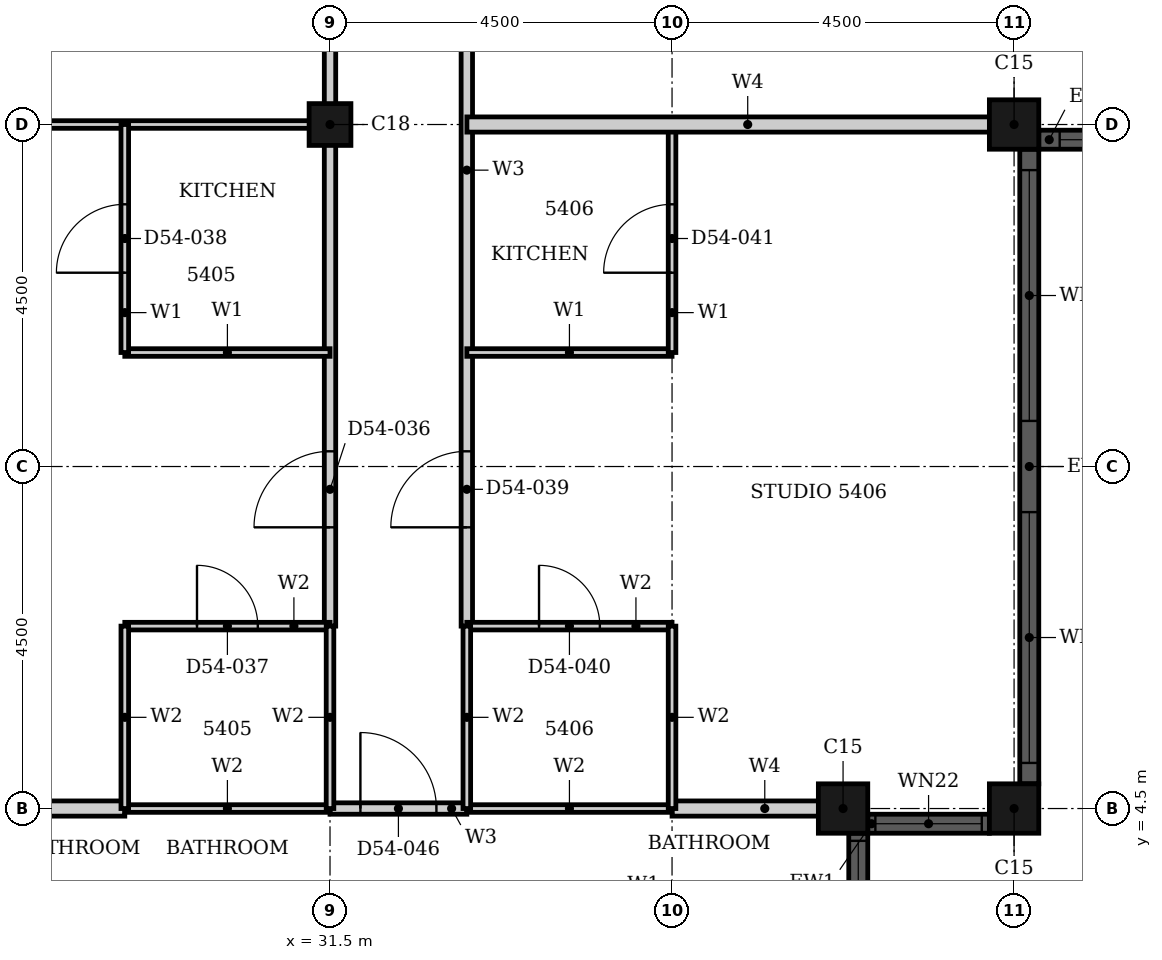
"""IFC4 building model, lengths in metres.
Left out: names, types, materials, properties, quantities, classifications, styles, units other than length and angle.
Written with IfcOpenShell. Run it as: python <this file> out.ifc"""

import sys

from ifc_helpers import new_model, si_unit, direction, frame, frame_2d, origin, origin_2d, place, context, subcontext, project, spatial, rectangle, hollow_rectangle, extrude, element, fill, save


model = new_model("IFC4")
c1 = context("Model", 3, precision=1e-05, world=origin(), true_north=direction((0.0, 1.0)))
c2 = subcontext(c1, "Body", "Model", "MODEL_VIEW")
j1 = project(units=[si_unit("LENGTHUNIT", "METRE"), si_unit("PLANEANGLEUNIT", "RADIAN")], contexts=[c1])
p1 = place(None, origin())
s1 = spatial("IfcSite", under=j1, at=p1, CompositionType="ELEMENT")
p2 = place(p1, origin())
s2 = spatial("IfcBuilding", under=s1, at=p2, CompositionType="ELEMENT")
p3 = place(p2, frame((0.0, 0.0, 214.6)))
s3 = spatial("IfcBuildingStorey", under=s2, at=p3, CompositionType="ELEMENT", Elevation=214.6)
for number, where, z_axis, x_axis in (
    (1, (40.5, 13.5, 0.0), (0.0, 0.0, 1.0), (1.0, 0.0, 0.0)),
    (2, (38.25, 4.5, 0.0), (0.0, 0.0, 1.0), (1.0, 0.0, 0.0)),
    (3, (40.5, 4.5, 0.0), (0.0, 0.0, 1.0), (1.0, 0.0, 0.0)),
):
    element("IfcColumn", number, at=place(p3, frame(where, z_axis=z_axis, x_axis=x_axis)), inside=s3, PredefinedType="COLUMN", context=c2, shape_type="SweptSolid", body=[
        extrude(hollow_rectangle(XDim=0.65, YDim=0.65, WallThickness=0.021, at=origin_2d()), origin(), (0.0, 0.0, 1.0), 3.7),
    ])
p4 = place(p3, frame((31.5, 13.5, 0.0), z_axis=(0.0, 0.0, 1.0), x_axis=(1.0, 0.0, 0.0)))
e4 = element("IfcColumn", 4, at=p4, inside=s3, PredefinedType="COLUMN", context=c2, shape_type="SweptSolid", body=[
    extrude(hollow_rectangle(XDim=0.55, YDim=0.55, WallThickness=0.018, at=origin_2d()), origin(), (0.0, 0.0, 1.0), 3.7),
])
p5 = place(p3, frame((40.825, 13.3, 0.0), z_axis=(0.0, 0.0, 1.0), x_axis=(1.0, 0.0, 0.0)))
e5 = element("IfcWall", 5, at=p5, inside=s3, PredefinedType="SOLIDWALL", context=c2, shape_type="SweptSolid", body=[
    extrude(rectangle(XDim=3.85, YDim=0.25, at=frame_2d((1.925, 0.0))), origin(), (0.0, 0.0, 1.0), 3.7),
])
p6 = place(p5, frame((0.275, 0.0, 0.45)))
e6 = element("IfcOpeningElement", 6, at=p6, cuts=e5, PredefinedType="OPENING", context=c2, shape_type="SweptSolid", body=[
    extrude(rectangle(XDim=3.3, YDim=2.3, at=frame_2d((1.65, 1.15))), frame((0.0, 0.135, 0.0), z_axis=(0.0, -1.0, 0.0), x_axis=(1.0, 0.0, 0.0)), (0.0, 0.0, 1.0), 0.27),
])
p7 = place(p3, frame((38.45, 2.575, 0.0), z_axis=(0.0, 0.0, 1.0), x_axis=(0.0, 1.0, 0.0)))
e7 = element("IfcWall", 7, at=p7, inside=s3, PredefinedType="SOLIDWALL", context=c2, shape_type="SweptSolid", body=[
    extrude(rectangle(XDim=1.6, YDim=0.25, at=frame_2d((0.8, 0.0))), origin(), (0.0, 0.0, 1.0), 3.7),
])
p8 = place(p7, frame((0.1, 0.0, 0.9)))
e8 = element("IfcOpeningElement", 8, at=p8, cuts=e7, PredefinedType="OPENING", context=c2, shape_type="SweptSolid", body=[
    extrude(rectangle(XDim=1.4, YDim=1.85, at=frame_2d((0.7, 0.925))), frame((0.0, 0.135, 0.0), z_axis=(0.0, -1.0, 0.0), x_axis=(1.0, 0.0, 0.0)), (0.0, 0.0, 1.0), 0.27),
])
p9 = place(p3, frame((38.575, 4.3, 0.0), z_axis=(0.0, 0.0, 1.0), x_axis=(1.0, 0.0, 0.0)))
e9 = element("IfcWall", 9, at=p9, inside=s3, PredefinedType="SOLIDWALL", context=c2, shape_type="SweptSolid", body=[
    extrude(rectangle(XDim=1.6, YDim=0.25, at=frame_2d((0.8, 0.0))), origin(), (0.0, 0.0, 1.0), 3.7),
])
p10 = place(p9, frame((0.1, 0.0, 0.9)))
e10 = element("IfcOpeningElement", 10, at=p10, cuts=e9, PredefinedType="OPENING", context=c2, shape_type="SweptSolid", body=[
    extrude(rectangle(XDim=1.4, YDim=1.85, at=frame_2d((0.7, 0.925))), frame((0.0, 0.135, 0.0), z_axis=(0.0, -1.0, 0.0), x_axis=(1.0, 0.0, 0.0)), (0.0, 0.0, 1.0), 0.27),
])
p11 = place(p3, frame((40.7, 4.825, 0.0), z_axis=(0.0, 0.0, 1.0), x_axis=(0.0, 1.0, 0.0)))
e11 = element("IfcWall", 11, at=p11, inside=s3, PredefinedType="SOLIDWALL", context=c2, shape_type="SweptSolid", body=[
    extrude(rectangle(XDim=8.35, YDim=0.25, at=frame_2d((4.175, 0.0))), origin(), (0.0, 0.0, 1.0), 3.7),
])
p12 = place(p11, frame((0.275, 0.0, 0.45)))
e12 = element("IfcOpeningElement", 12, at=p12, cuts=e11, PredefinedType="OPENING", context=c2, shape_type="SweptSolid", body=[
    extrude(rectangle(XDim=3.3, YDim=2.3, at=frame_2d((1.65, 1.15))), frame((0.0, 0.135, 0.0), z_axis=(0.0, -1.0, 0.0), x_axis=(1.0, 0.0, 0.0)), (0.0, 0.0, 1.0), 0.27),
])
p13 = place(p11, frame((4.775, 0.0, 0.45)))
e13 = element("IfcOpeningElement", 13, at=p13, cuts=e11, PredefinedType="OPENING", context=c2, shape_type="SweptSolid", body=[
    extrude(rectangle(XDim=3.3, YDim=2.3, at=frame_2d((1.65, 1.15))), frame((0.0, 0.135, 0.0), z_axis=(0.0, -1.0, 0.0), x_axis=(1.0, 0.0, 0.0)), (0.0, 0.0, 1.0), 0.27),
])
p14 = place(p3, frame((31.5, 4.5, 0.0), z_axis=(0.0, 0.0, 1.0), x_axis=(1.0, 0.0, 0.0)))
e14 = element("IfcWall", 14, at=p14, inside=s3, PredefinedType="PARTITIONING", context=c2, shape_type="SweptSolid", body=[
    extrude(rectangle(XDim=1.8, YDim=0.15, at=frame_2d((0.9, 0.0))), origin(), (0.0, 0.0, 1.0), 3.4),
])
p15 = place(p14, frame((0.4, 0.0, 0.0)))
e15 = element("IfcOpeningElement", 15, at=p15, cuts=e14, PredefinedType="OPENING", context=c2, shape_type="SweptSolid", body=[
    extrude(rectangle(XDim=1.0, YDim=2.2, at=frame_2d((0.5, 1.1))), frame((0.0, 0.085, 0.0), z_axis=(0.0, -1.0, 0.0), x_axis=(1.0, 0.0, 0.0)), (0.0, 0.0, 1.0), 0.17),
])
p16 = place(p3, frame((31.5, 6.9, 0.0), z_axis=(0.0, 0.0, 1.0), x_axis=(0.0, 1.0, 0.0)))
e16 = element("IfcWall", 16, at=p16, inside=s3, PredefinedType="PARTITIONING", context=c2, shape_type="SweptSolid", body=[
    extrude(rectangle(XDim=13.8, YDim=0.15, at=frame_2d((6.9, 0.0))), origin(), (0.0, 0.0, 1.0), 2.68),
])
p17 = place(p16, frame((1.3, 0.0, 0.0)))
e17 = element("IfcOpeningElement", 17, at=p17, cuts=e16, PredefinedType="OPENING", context=c2, shape_type="SweptSolid", body=[
    extrude(rectangle(XDim=1.0, YDim=2.2, at=frame_2d((0.5, 1.1))), frame((0.0, 0.085, 0.0), z_axis=(0.0, -1.0, 0.0), x_axis=(1.0, 0.0, 0.0)), (0.0, 0.0, 1.0), 0.17),
])
p18 = place(p3, frame((33.3, 6.9, 0.0), z_axis=(0.0, 0.0, 1.0), x_axis=(0.0, 1.0, 0.0)))
e18 = element("IfcWall", 18, at=p18, inside=s3, PredefinedType="PARTITIONING", context=c2, shape_type="SweptSolid", body=[
    extrude(rectangle(XDim=13.799, YDim=0.15, at=frame_2d((6.899, 0.0))), origin(), (0.0, 0.0, 1.0), 3.4),
])
p19 = place(p18, frame((9.699, 0.0, 0.0)))
e19 = element("IfcOpeningElement", 19, at=p19, cuts=e18, PredefinedType="OPENING", context=c2, shape_type="SweptSolid", body=[
    extrude(rectangle(XDim=1.0, YDim=2.2, at=frame_2d((0.5, 1.1))), frame((0.0, 0.085, 0.0), z_axis=(0.0, -1.0, 0.0), x_axis=(1.0, 0.0, 0.0)), (0.0, 0.0, 1.0), 0.17),
])
p20 = place(p18, frame((1.3, 0.0, 0.0)))
e20 = element("IfcOpeningElement", 20, at=p20, cuts=e18, PredefinedType="OPENING", context=c2, shape_type="SweptSolid", body=[
    extrude(rectangle(XDim=1.0, YDim=2.2, at=frame_2d((0.5, 1.1))), frame((0.0, 0.085, 0.0), z_axis=(0.0, -1.0, 0.0), x_axis=(1.0, 0.0, 0.0)), (0.0, 0.0, 1.0), 0.17),
])
for number, where, z_axis, x_axis in (
    (21, (33.3, 10.5, 0.0), (0.0, 0.0, 1.0), (1.0, 0.0, 0.0)),
    (22, (28.8, 10.5, 0.0), (0.0, 0.0, 1.0), (1.0, 0.0, 0.0)),
):
    element("IfcWall", number, at=place(p3, frame(where, z_axis=z_axis, x_axis=x_axis)), inside=s3, PredefinedType="PARTITIONING", context=c2, shape_type="SweptSolid", body=[
        extrude(rectangle(XDim=2.7, YDim=0.1, at=frame_2d((1.35, 0.0))), origin(), (0.0, 0.0, 1.0), 3.4),
    ])
p21 = place(p3, frame((22.31, 13.5, 0.0), z_axis=(0.0, 0.0, 1.0), x_axis=(1.0, 0.0, 0.0)))
e23 = element("IfcWall", 23, at=p21, inside=s3, PredefinedType="PARTITIONING", context=c2, shape_type="SweptSolid", body=[
    extrude(rectangle(XDim=9.19, YDim=0.1, at=frame_2d((4.595, 0.0))), origin(), (0.0, 0.0, 1.0), 2.48),
])
p22 = place(p3, frame((28.8, 10.5, 0.0), z_axis=(0.0, 0.0, 1.0), x_axis=(0.0, 1.0, 0.0)))
e24 = element("IfcWall", 24, at=p22, inside=s3, PredefinedType="PARTITIONING", context=c2, shape_type="SweptSolid", body=[
    extrude(rectangle(XDim=3.0, YDim=0.1, at=frame_2d((1.5, 0.0))), origin(), (0.0, 0.0, 1.0), 3.4),
])
p23 = place(p22, frame((1.05, 0.0, 0.0)))
e25 = element("IfcOpeningElement", 25, at=p23, cuts=e24, PredefinedType="OPENING", context=c2, shape_type="SweptSolid", body=[
    extrude(rectangle(XDim=0.9, YDim=2.1, at=frame_2d((0.45, 1.05))), frame((0.0, 0.06, 0.0), z_axis=(0.0, -1.0, 0.0), x_axis=(1.0, 0.0, 0.0)), (0.0, 0.0, 1.0), 0.12),
])
p24 = place(p3, frame((36.0, 10.5, 0.0), z_axis=(0.0, 0.0, 1.0), x_axis=(0.0, 1.0, 0.0)))
e26 = element("IfcWall", 26, at=p24, inside=s3, PredefinedType="PARTITIONING", context=c2, shape_type="SweptSolid", body=[
    extrude(rectangle(XDim=3.0, YDim=0.1, at=frame_2d((1.5, 0.0))), origin(), (0.0, 0.0, 1.0), 2.68),
])
p25 = place(p24, frame((1.05, 0.0, 0.0)))
e27 = element("IfcOpeningElement", 27, at=p25, cuts=e26, PredefinedType="OPENING", context=c2, shape_type="SweptSolid", body=[
    extrude(rectangle(XDim=0.9, YDim=2.1, at=frame_2d((0.45, 1.05))), frame((0.0, 0.06, 0.0), z_axis=(0.0, -1.0, 0.0), x_axis=(1.0, 0.0, 0.0)), (0.0, 0.0, 1.0), 0.12),
])
p26 = place(p3, frame((33.301, 13.5, 0.0), z_axis=(0.0, 0.0, 1.0), x_axis=(1.0, 0.0, 0.0)))
e28 = element("IfcWall", 28, at=p26, inside=s3, PredefinedType="PARTITIONING", context=c2, shape_type="SweptSolid", body=[
    extrude(rectangle(XDim=7.389, YDim=0.2, at=frame_2d((3.694, 0.0))), origin(), (0.0, 0.0, 1.0), 2.48),
])
p27 = place(p3, frame((36.0, 4.5, 0.0), z_axis=(0.0, 0.0, 1.0), x_axis=(1.0, 0.0, 0.0)))
e29 = element("IfcWall", 29, at=p27, inside=s3, PredefinedType="PARTITIONING", context=c2, shape_type="SweptSolid", body=[
    extrude(rectangle(XDim=2.44, YDim=0.2, at=frame_2d((1.22, 0.0))), origin(), (0.0, 0.0, 1.0), 3.4),
])
p28 = place(p3, frame((24.56, 4.5, 0.0), z_axis=(0.0, 0.0, 1.0), x_axis=(1.0, 0.0, 0.0)))
e30 = element("IfcWall", 30, at=p28, inside=s3, PredefinedType="PARTITIONING", context=c2, shape_type="SweptSolid", body=[
    extrude(rectangle(XDim=4.24, YDim=0.2, at=frame_2d((2.12, 0.0))), origin(), (0.0, 0.0, 1.0), 3.4),
])
for number, where, z_axis, x_axis in (
    (31, (33.3, 4.5, 0.0), (0.0, 0.0, 1.0), (1.0, 0.0, 0.0)),
    (32, (28.8, 4.5, 0.0), (0.0, 0.0, 1.0), (1.0, 0.0, 0.0)),
):
    element("IfcWall", number, at=place(p3, frame(where, z_axis=z_axis, x_axis=x_axis)), inside=s3, PredefinedType="PARTITIONING", context=c2, shape_type="SweptSolid", body=[
        extrude(rectangle(XDim=2.7, YDim=0.1, at=frame_2d((1.35, 0.0))), origin(), (0.0, 0.0, 1.0), 3.4),
    ])
p29 = place(p3, frame((33.3, 6.9, 0.0), z_axis=(0.0, 0.0, 1.0), x_axis=(1.0, 0.0, 0.0)))
e33 = element("IfcWall", 33, at=p29, inside=s3, PredefinedType="PARTITIONING", context=c2, shape_type="SweptSolid", body=[
    extrude(rectangle(XDim=2.7, YDim=0.1, at=frame_2d((1.35, 0.0))), origin(), (0.0, 0.0, 1.0), 3.4),
])
p30 = place(p29, frame((0.95, 0.0, 0.0)))
e34 = element("IfcOpeningElement", 34, at=p30, cuts=e33, PredefinedType="OPENING", context=c2, shape_type="SweptSolid", body=[
    extrude(rectangle(XDim=0.8, YDim=2.1, at=frame_2d((0.4, 1.05))), frame((0.0, 0.06, 0.0), z_axis=(0.0, -1.0, 0.0), x_axis=(1.0, 0.0, 0.0)), (0.0, 0.0, 1.0), 0.12),
])
p31 = place(p3, frame((28.8, 6.9, 0.0), z_axis=(0.0, 0.0, 1.0), x_axis=(1.0, 0.0, 0.0)))
e35 = element("IfcWall", 35, at=p31, inside=s3, PredefinedType="PARTITIONING", context=c2, shape_type="SweptSolid", body=[
    extrude(rectangle(XDim=2.7, YDim=0.1, at=frame_2d((1.35, 0.0))), origin(), (0.0, 0.0, 1.0), 3.4),
])
p32 = place(p31, frame((0.95, 0.0, 0.0)))
e36 = element("IfcOpeningElement", 36, at=p32, cuts=e35, PredefinedType="OPENING", context=c2, shape_type="SweptSolid", body=[
    extrude(rectangle(XDim=0.8, YDim=2.1, at=frame_2d((0.4, 1.05))), frame((0.0, 0.06, 0.0), z_axis=(0.0, -1.0, 0.0), x_axis=(1.0, 0.0, 0.0)), (0.0, 0.0, 1.0), 0.12),
])
p33 = place(p3, frame((28.8, 4.5, 0.0), z_axis=(0.0, 0.0, 1.0), x_axis=(0.0, 1.0, 0.0)))
e37 = element("IfcWall", 37, at=p33, inside=s3, PredefinedType="PARTITIONING", context=c2, shape_type="SweptSolid", body=[
    extrude(rectangle(XDim=2.4, YDim=0.1, at=frame_2d((1.2, 0.0))), origin(), (0.0, 0.0, 1.0), 3.4),
])
p34 = place(p3, frame((31.5, 4.5, 0.0), z_axis=(0.0, 0.0, 1.0), x_axis=(0.0, 1.0, 0.0)))
e38 = element("IfcWall", 38, at=p34, inside=s3, PredefinedType="PARTITIONING", context=c2, shape_type="SweptSolid", body=[
    extrude(rectangle(XDim=2.4, YDim=0.1, at=frame_2d((1.2, 0.0))), origin(), (0.0, 0.0, 1.0), 2.68),
])
p35 = place(p3, frame((33.3, 4.5, 0.0), z_axis=(0.0, 0.0, 1.0), x_axis=(0.0, 1.0, 0.0)))
e39 = element("IfcWall", 39, at=p35, inside=s3, PredefinedType="PARTITIONING", context=c2, shape_type="SweptSolid", body=[
    extrude(rectangle(XDim=2.4, YDim=0.1, at=frame_2d((1.2, 0.0))), origin(), (0.0, 0.0, 1.0), 3.4),
])
p36 = place(p3, frame((36.0, 4.5, 0.0), z_axis=(0.0, 0.0, 1.0), x_axis=(0.0, 1.0, 0.0)))
e40 = element("IfcWall", 40, at=p36, inside=s3, PredefinedType="PARTITIONING", context=c2, shape_type="SweptSolid", body=[
    extrude(rectangle(XDim=2.4, YDim=0.1, at=frame_2d((1.2, 0.0))), origin(), (0.0, 0.0, 1.0), 2.68),
])
p37 = place(p6, origin())
e41 = element("IfcWindow", 41, at=p37, inside=s3, PartitioningType="SINGLE_PANEL", PredefinedType="WINDOW", context=c2, shape_type="SweptSolid", body=[
    extrude(rectangle(XDim=3.3, YDim=2.3, at=frame_2d((1.65, 1.15))), frame((0.0, 0.03, 0.0), z_axis=(0.0, -1.0, 0.0), x_axis=(1.0, 0.0, 0.0)), (0.0, 0.0, 1.0), 0.06),
])
fill(e6, e41)
p38 = place(p8, origin())
e42 = element("IfcWindow", 42, at=p38, inside=s3, PartitioningType="SINGLE_PANEL", PredefinedType="WINDOW", context=c2, shape_type="SweptSolid", body=[
    extrude(rectangle(XDim=1.4, YDim=1.85, at=frame_2d((0.7, 0.925))), frame((0.0, 0.03, 0.0), z_axis=(0.0, -1.0, 0.0), x_axis=(1.0, 0.0, 0.0)), (0.0, 0.0, 1.0), 0.06),
])
fill(e8, e42)
p39 = place(p10, origin())
e43 = element("IfcWindow", 43, at=p39, inside=s3, PartitioningType="SINGLE_PANEL", PredefinedType="WINDOW", context=c2, shape_type="SweptSolid", body=[
    extrude(rectangle(XDim=1.4, YDim=1.85, at=frame_2d((0.7, 0.925))), frame((0.0, 0.03, 0.0), z_axis=(0.0, -1.0, 0.0), x_axis=(1.0, 0.0, 0.0)), (0.0, 0.0, 1.0), 0.06),
])
fill(e10, e43)
p40 = place(p12, origin())
e44 = element("IfcWindow", 44, at=p40, inside=s3, PartitioningType="SINGLE_PANEL", PredefinedType="WINDOW", context=c2, shape_type="SweptSolid", body=[
    extrude(rectangle(XDim=3.3, YDim=2.3, at=frame_2d((1.65, 1.15))), frame((0.0, 0.03, 0.0), z_axis=(0.0, -1.0, 0.0), x_axis=(1.0, 0.0, 0.0)), (0.0, 0.0, 1.0), 0.06),
])
fill(e12, e44)
p41 = place(p13, origin())
e45 = element("IfcWindow", 45, at=p41, inside=s3, PartitioningType="SINGLE_PANEL", PredefinedType="WINDOW", context=c2, shape_type="SweptSolid", body=[
    extrude(rectangle(XDim=3.3, YDim=2.3, at=frame_2d((1.65, 1.15))), frame((0.0, 0.03, 0.0), z_axis=(0.0, -1.0, 0.0), x_axis=(1.0, 0.0, 0.0)), (0.0, 0.0, 1.0), 0.06),
])
fill(e13, e45)
p42 = place(p17, origin())
e46 = element("IfcDoor", 46, at=p42, inside=s3, OperationType="SINGLE_SWING_LEFT", PredefinedType="DOOR", context=c2, shape_type="SweptSolid", body=[
    extrude(rectangle(XDim=1.0, YDim=2.2, at=frame_2d((0.5, 1.1))), frame((0.0, 0.025, 0.0), z_axis=(0.0, -1.0, 0.0), x_axis=(1.0, 0.0, 0.0)), (0.0, 0.0, 1.0), 0.05),
])
fill(e17, e46)
p43 = place(p32, origin())
e47 = element("IfcDoor", 47, at=p43, inside=s3, OperationType="SINGLE_SWING_RIGHT", PredefinedType="DOOR", context=c2, shape_type="SweptSolid", body=[
    extrude(rectangle(XDim=0.8, YDim=2.1, at=frame_2d((0.4, 1.05))), frame((0.0, 0.025, 0.0), z_axis=(0.0, -1.0, 0.0), x_axis=(1.0, 0.0, 0.0)), (0.0, 0.0, 1.0), 0.05),
])
fill(e36, e47)
p44 = place(p23, origin())
e48 = element("IfcDoor", 48, at=p44, inside=s3, OperationType="SINGLE_SWING_RIGHT", PredefinedType="DOOR", context=c2, shape_type="SweptSolid", body=[
    extrude(rectangle(XDim=0.9, YDim=2.1, at=frame_2d((0.45, 1.05))), frame((0.0, 0.025, 0.0), z_axis=(0.0, -1.0, 0.0), x_axis=(1.0, 0.0, 0.0)), (0.0, 0.0, 1.0), 0.05),
])
fill(e25, e48)
p45 = place(p20, origin())
e49 = element("IfcDoor", 49, at=p45, inside=s3, OperationType="SINGLE_SWING_RIGHT", PredefinedType="DOOR", context=c2, shape_type="SweptSolid", body=[
    extrude(rectangle(XDim=1.0, YDim=2.2, at=frame_2d((0.5, 1.1))), frame((0.0, 0.025, 0.0), z_axis=(0.0, -1.0, 0.0), x_axis=(1.0, 0.0, 0.0)), (0.0, 0.0, 1.0), 0.05),
])
fill(e20, e49)
p46 = place(p30, origin())
e50 = element("IfcDoor", 50, at=p46, inside=s3, OperationType="SINGLE_SWING_LEFT", PredefinedType="DOOR", context=c2, shape_type="SweptSolid", body=[
    extrude(rectangle(XDim=0.8, YDim=2.1, at=frame_2d((0.4, 1.05))), frame((0.0, 0.025, 0.0), z_axis=(0.0, -1.0, 0.0), x_axis=(1.0, 0.0, 0.0)), (0.0, 0.0, 1.0), 0.05),
])
fill(e34, e50)
p47 = place(p25, origin())
e51 = element("IfcDoor", 51, at=p47, inside=s3, OperationType="SINGLE_SWING_LEFT", PredefinedType="DOOR", context=c2, shape_type="SweptSolid", body=[
    extrude(rectangle(XDim=0.9, YDim=2.1, at=frame_2d((0.45, 1.05))), frame((0.0, 0.025, 0.0), z_axis=(0.0, -1.0, 0.0), x_axis=(1.0, 0.0, 0.0)), (0.0, 0.0, 1.0), 0.05),
])
fill(e27, e51)
p48 = place(p15, origin())
e52 = element("IfcDoor", 52, at=p48, inside=s3, OperationType="SINGLE_SWING_RIGHT", PredefinedType="DOOR", context=c2, shape_type="SweptSolid", body=[
    extrude(rectangle(XDim=1.0, YDim=2.2, at=frame_2d((0.5, 1.1))), frame((0.0, 0.025, 0.0), z_axis=(0.0, -1.0, 0.0), x_axis=(1.0, 0.0, 0.0)), (0.0, 0.0, 1.0), 0.05),
])
fill(e15, e52)
save(model, sys.argv[1])
